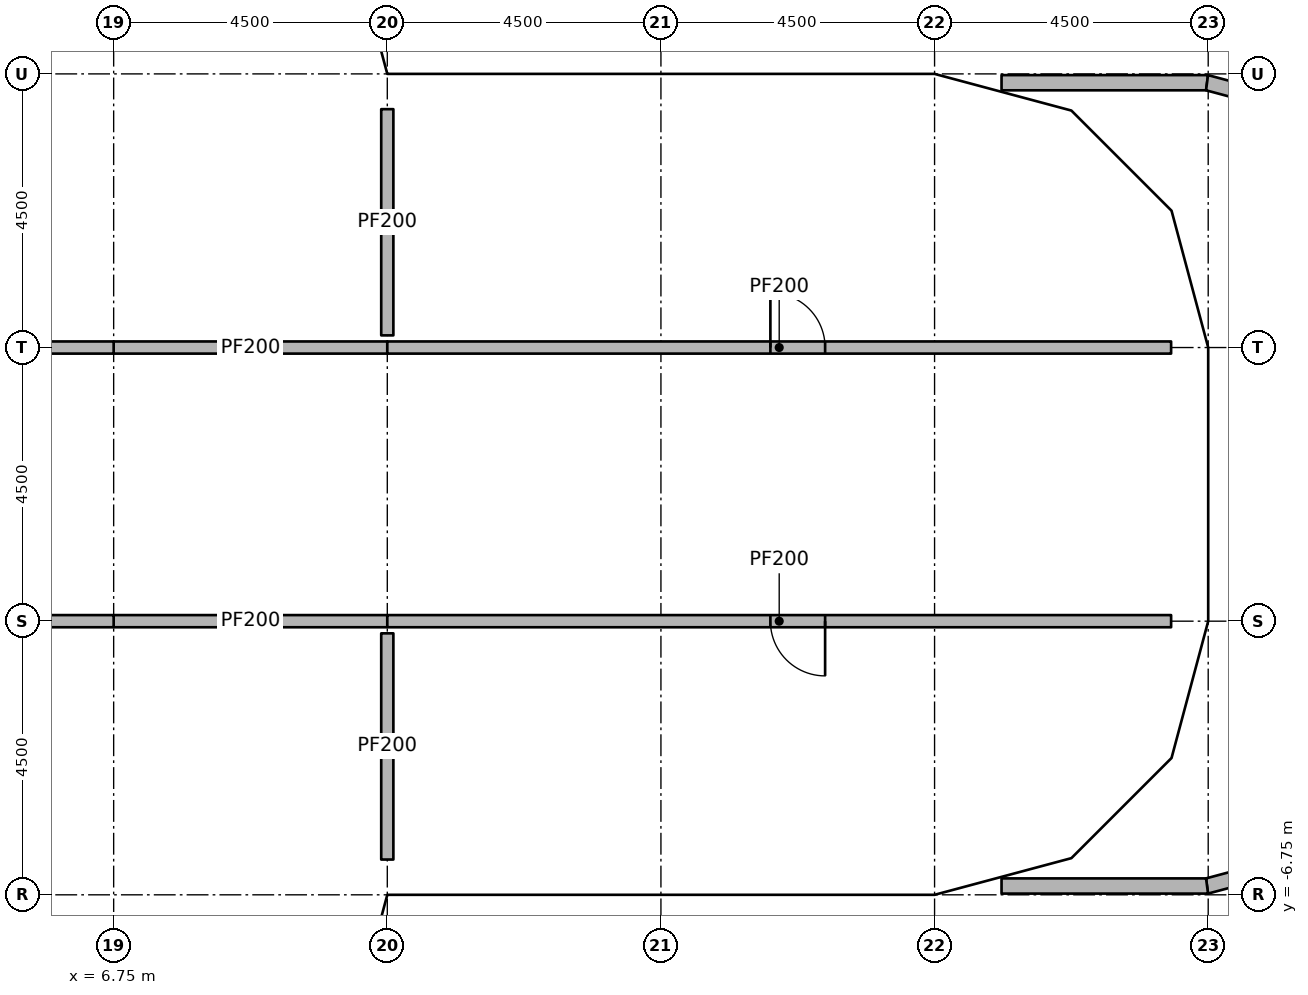
"""IFC4 building model, lengths in metres.
Left out: names, types, materials, properties, quantities, classifications, styles, units other than length and angle.
Written with IfcOpenShell. Run it as: python <this file> out.ifc"""

import sys

from ifc_helpers import new_model, si_unit, direction, frame, frame_2d, origin, origin_2d, place, context, subcontext, project, spatial, polyline, rectangle, outline, extrude, element, fill, save


model = new_model("IFC4")
c1 = context("Model", 3, precision=1e-05, world=origin(), true_north=direction((0.0, 1.0)))
c2 = subcontext(c1, "Body", "Model", "MODEL_VIEW")
j1 = project(units=[si_unit("LENGTHUNIT", "METRE"), si_unit("PLANEANGLEUNIT", "RADIAN")], contexts=[c1])
p1 = place(None, origin())
s1 = spatial("IfcSite", under=j1, at=p1, CompositionType="ELEMENT")
p2 = place(p1, origin())
s2 = spatial("IfcBuilding", under=s1, at=p2, CompositionType="ELEMENT")
p3 = place(p2, frame((0.0, 0.0, 291.6)))
s3 = spatial("IfcBuildingStorey", under=s2, at=p3, CompositionType="ELEMENT", Elevation=291.6)
for number, where, z_axis, x_axis in (
    (1, (6.25, -6.25, 0.0), (0.0, 0.0, 1.0), (1.0, 0.0, 0.0)),
    (2, (6.25, 6.25, 0.0), (0.0, 0.0, 1.0), (1.0, 0.0, 0.0)),
    (3, (10.75, -6.25, 0.0), (0.0, 0.0, 1.0), (1.0, 0.0, 0.0)),
    (4, (10.75, 6.25, 0.0), (0.0, 0.0, 1.0), (1.0, 0.0, 0.0)),
    (5, (15.75, -6.25, 0.0), (0.0, 0.0, 1.0), (1.0, 0.0, 0.0)),
    (6, (15.75, 6.25, 0.0), (0.0, 0.0, 1.0), (1.0, 0.0, 0.0)),
    (7, (20.25, -6.11, 0.0), (0.0, 0.0, 1.0), (1.0, 0.0, 0.0)),
    (8, (20.25, 6.11, 0.0), (0.0, 0.0, 1.0), (1.0, 0.0, 0.0)),
):
    element("IfcColumn", number, at=place(p3, frame(where, z_axis=z_axis, x_axis=x_axis)), inside=s3, PredefinedType="COLUMN", context=c2, shape_type="SweptSolid", body=[
        extrude(rectangle(XDim=0.6, YDim=0.6, at=origin_2d()), origin(), (0.0, 0.0, 1.0), 3.45),
    ])
p4 = place(p3, origin())
e9 = element("IfcWall", 9, at=p4, inside=s3, PredefinedType="PARAPET", context=c2, shape_type="SweptSolid", body=[
    extrude(outline(polyline([(21.351, 6.73), (24.747, 6.73), (24.715, 6.48), (21.351, 6.48), (21.351, 6.73)])), origin(), (0.0, 0.0, 1.0), 1.22),
])
p5 = place(p3, origin())
e10 = element("IfcWall", 10, at=p5, inside=s3, PredefinedType="PARAPET", context=c2, shape_type="SweptSolid", body=[
    extrude(outline(polyline([(24.747, 6.73), (26.99, 6.129), (26.86, 5.905), (24.715, 6.48), (24.747, 6.73)])), origin(), (0.0, 0.0, 1.0), 1.22),
])
p6 = place(p3, origin())
e11 = element("IfcWall", 11, at=p6, inside=s3, PredefinedType="PARAPET", context=c2, shape_type="SweptSolid", body=[
    extrude(outline(polyline([(26.99, -6.129), (24.747, -6.73), (24.715, -6.48), (26.86, -5.905), (26.99, -6.129)])), origin(), (0.0, 0.0, 1.0), 1.22),
])
p7 = place(p3, origin())
e12 = element("IfcWall", 12, at=p7, inside=s3, PredefinedType="PARAPET", context=c2, shape_type="SweptSolid", body=[
    extrude(outline(polyline([(24.747, -6.73), (21.351, -6.73), (21.351, -6.48), (24.715, -6.48), (24.747, -6.73)])), origin(), (0.0, 0.0, 1.0), 1.22),
])
p8 = place(p3, frame((11.25, 2.25, 0.0), z_axis=(0.0, 0.0, 1.0), x_axis=(-1.0, 0.0, 0.0)))
e13 = element("IfcWall", 13, at=p8, inside=s3, PredefinedType="PARTITIONING", context=c2, shape_type="SweptSolid", body=[
    extrude(rectangle(XDim=4.5, YDim=0.2, at=frame_2d((2.25, 0.0))), origin(), (0.0, 0.0, 1.0), 2.828),
])
p9 = place(p3, frame((11.25, 6.17, 0.0), z_axis=(0.0, 0.0, 1.0), x_axis=(0.0, -1.0, 0.0)))
e14 = element("IfcWall", 14, at=p9, inside=s3, PredefinedType="PARTITIONING", context=c2, shape_type="SweptSolid", body=[
    extrude(rectangle(XDim=3.72, YDim=0.2, at=frame_2d((1.86, 0.0))), origin(), (0.0, 0.0, 1.0), 3.45),
])
p10 = place(p3, frame((6.75, 2.25, 0.0), z_axis=(0.0, 0.0, 1.0), x_axis=(-1.0, 0.0, 0.0)))
e15 = element("IfcWall", 15, at=p10, inside=s3, PredefinedType="PARTITIONING", context=c2, shape_type="SweptSolid", body=[
    extrude(rectangle(XDim=4.3, YDim=0.2, at=frame_2d((2.15, 0.0))), origin(), (0.0, 0.0, 1.0), 2.828),
])
p11 = place(p3, frame((6.75, -2.25, 0.0), z_axis=(0.0, 0.0, 1.0), x_axis=(1.0, 0.0, 0.0)))
e16 = element("IfcWall", 16, at=p11, inside=s3, PredefinedType="PARTITIONING", context=c2, shape_type="SweptSolid", body=[
    extrude(rectangle(XDim=4.5, YDim=0.2, at=frame_2d((2.25, 0.0))), origin(), (0.0, 0.0, 1.0), 2.828),
])
p12 = place(p3, frame((11.25, -2.45, 0.0), z_axis=(0.0, 0.0, 1.0), x_axis=(0.0, -1.0, 0.0)))
e17 = element("IfcWall", 17, at=p12, inside=s3, PredefinedType="PARTITIONING", context=c2, shape_type="SweptSolid", body=[
    extrude(rectangle(XDim=3.72, YDim=0.2, at=frame_2d((1.86, 0.0))), origin(), (0.0, 0.0, 1.0), 3.45),
])
p13 = place(p3, frame((2.45, -2.25, 0.0), z_axis=(0.0, 0.0, 1.0), x_axis=(1.0, 0.0, 0.0)))
e18 = element("IfcWall", 18, at=p13, inside=s3, PredefinedType="PARTITIONING", context=c2, shape_type="SweptSolid", body=[
    extrude(rectangle(XDim=4.3, YDim=0.2, at=frame_2d((2.15, 0.0))), origin(), (0.0, 0.0, 1.0), 2.828),
])
p14 = place(p3, frame((11.25, 2.25, 0.0), z_axis=(0.0, 0.0, 1.0), x_axis=(1.0, 0.0, 0.0)))
e19 = element("IfcWall", 19, at=p14, inside=s3, PredefinedType="PARTITIONING", context=c2, shape_type="SweptSolid", body=[
    extrude(rectangle(XDim=12.89, YDim=0.2, at=frame_2d((6.445, 0.0))), origin(), (0.0, 0.0, 1.0), 2.53),
])
p15 = place(p14, frame((6.3, 0.0, 0.0)))
e20 = element("IfcOpeningElement", 20, at=p15, cuts=e19, PredefinedType="OPENING", context=c2, shape_type="SweptSolid", body=[
    extrude(rectangle(XDim=0.9, YDim=2.1, at=frame_2d((0.45, 1.05))), frame((0.0, 0.11, 0.0), z_axis=(0.0, -1.0, 0.0), x_axis=(1.0, 0.0, 0.0)), (0.0, 0.0, 1.0), 0.22),
])
p16 = place(p3, frame((24.14, -2.25, 0.0), z_axis=(0.0, 0.0, 1.0), x_axis=(-1.0, 0.0, 0.0)))
e21 = element("IfcWall", 21, at=p16, inside=s3, PredefinedType="PARTITIONING", context=c2, shape_type="SweptSolid", body=[
    extrude(rectangle(XDim=12.89, YDim=0.2, at=frame_2d((6.445, 0.0))), origin(), (0.0, 0.0, 1.0), 2.53),
])
p17 = place(p16, frame((5.69, 0.0, 0.0)))
e22 = element("IfcOpeningElement", 22, at=p17, cuts=e21, PredefinedType="OPENING", context=c2, shape_type="SweptSolid", body=[
    extrude(rectangle(XDim=0.9, YDim=2.1, at=frame_2d((0.45, 1.05))), frame((0.0, 0.11, 0.0), z_axis=(0.0, -1.0, 0.0), x_axis=(1.0, 0.0, 0.0)), (0.0, 0.0, 1.0), 0.22),
])
p18 = place(p15, origin())
e23 = element("IfcDoor", 23, at=p18, inside=s3, OperationType="SINGLE_SWING_LEFT", PredefinedType="DOOR", context=c2, shape_type="SweptSolid", body=[
    extrude(rectangle(XDim=0.9, YDim=2.1, at=frame_2d((0.45, 1.05))), frame((0.0, 0.025, 0.0), z_axis=(0.0, -1.0, 0.0), x_axis=(1.0, 0.0, 0.0)), (0.0, 0.0, 1.0), 0.05),
])
fill(e20, e23)
p19 = place(p17, origin())
e24 = element("IfcDoor", 24, at=p19, inside=s3, OperationType="SINGLE_SWING_LEFT", PredefinedType="DOOR", context=c2, shape_type="SweptSolid", body=[
    extrude(rectangle(XDim=0.9, YDim=2.1, at=frame_2d((0.45, 1.05))), frame((0.0, 0.025, 0.0), z_axis=(0.0, -1.0, 0.0), x_axis=(1.0, 0.0, 0.0)), (0.0, 0.0, 1.0), 0.05),
])
fill(e22, e24)
save(model, sys.argv[1])
